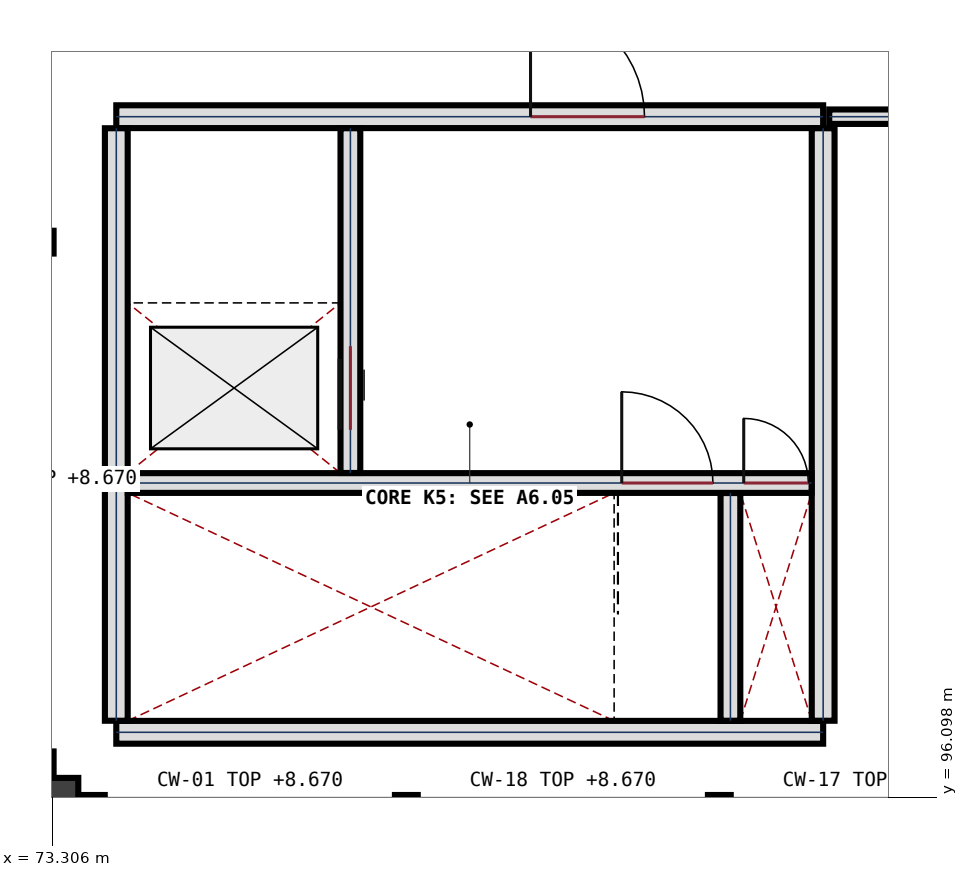
"""IFC4 building model, lengths in metres.
Left out: names, types, materials, properties, quantities, classifications, styles, units other than length and angle.
Written with IfcOpenShell. Run it as: python <this file> out.ifc"""

import sys

from ifc_helpers import new_model, si_unit, direction, frame, frame_2d, origin, origin_2d, place, context, subcontext, project, spatial, rectangle, extrude, element, fill, save


model = new_model("IFC4")
c1 = context("Model", 3, precision=1e-05, world=origin(), true_north=direction((0.0, 1.0)))
c2 = subcontext(c1, "Body", "Model", "MODEL_VIEW")
j1 = project(units=[si_unit("LENGTHUNIT", "METRE"), si_unit("PLANEANGLEUNIT", "RADIAN")], contexts=[c1])
p1 = place(None, origin())
s1 = spatial("IfcSite", under=j1, at=p1, CompositionType="ELEMENT")
p2 = place(p1, origin())
s2 = spatial("IfcBuilding", under=s1, at=p2, CompositionType="ELEMENT")
p3 = place(p2, frame((0.0, 0.0, 5.4)))
s3 = spatial("IfcBuildingStorey", under=s2, at=p3, CompositionType="ELEMENT", Elevation=5.4)
p4 = place(p3, frame((73.2, 96.0, 0.0), z_axis=(0.0, 0.0, 1.0), x_axis=(1.0, 0.0, 0.0)))
e1 = element("IfcColumn", 1, at=p4, inside=s3, PredefinedType="COLUMN", context=c2, shape_type="SweptSolid", body=[
    extrude(rectangle(XDim=0.9, YDim=0.7, at=origin_2d()), origin(), (0.0, 0.0, 1.0), 4.5),
])
p5 = place(p3, frame((73.998, 96.0, 0.0), z_axis=(0.0, 0.0, 1.0), x_axis=(-1.0, 0.0, 0.0)))
e2 = element("IfcWall", 2, at=p5, inside=s3, PredefinedType="SOLIDWALL", context=c2, shape_type="SweptSolid", body=[
    extrude(rectangle(XDim=0.35, YDim=0.25, at=frame_2d((0.175, 0.0))), origin(), (0.0, 0.0, 1.0), 3.27),
])
p6 = place(p3, frame((82.234, 96.0, 0.0), z_axis=(0.0, 0.0, 1.0), x_axis=(-1.0, 0.0, 0.0)))
e3 = element("IfcWall", 3, at=p6, inside=s3, PredefinedType="SOLIDWALL", context=c2, shape_type="SweptSolid", body=[
    extrude(rectangle(XDim=0.3, YDim=0.25, at=frame_2d((0.15, 0.0))), origin(), (0.0, 0.0, 1.0), 3.27),
])
p7 = place(p3, frame((78.116, 96.0, 0.0), z_axis=(0.0, 0.0, 1.0), x_axis=(-1.0, 0.0, 0.0)))
e4 = element("IfcWall", 4, at=p7, inside=s3, PredefinedType="SOLIDWALL", context=c2, shape_type="SweptSolid", body=[
    extrude(rectangle(XDim=0.3, YDim=0.25, at=frame_2d((0.15, 0.0))), origin(), (0.0, 0.0, 1.0), 3.27),
])
p8 = place(p3, frame((73.2, 96.348, 0.0), z_axis=(0.0, 0.0, 1.0), x_axis=(0.0, 1.0, 0.0)))
e5 = element("IfcWall", 5, at=p8, inside=s3, PredefinedType="SOLIDWALL", context=c2, shape_type="SweptSolid", body=[
    extrude(rectangle(XDim=0.35, YDim=0.25, at=frame_2d((0.175, 0.0))), origin(), (0.0, 0.0, 1.0), 3.27),
])
p9 = place(p3, frame((73.2, 103.249, 0.0), z_axis=(0.0, 0.0, 1.0), x_axis=(0.0, 1.0, 0.0)))
e6 = element("IfcWall", 6, at=p9, inside=s3, PredefinedType="SOLIDWALL", context=c2, shape_type="SweptSolid", body=[
    extrude(rectangle(XDim=0.3, YDim=0.25, at=frame_2d((0.15, 0.0))), origin(), (0.0, 0.0, 1.0), 3.27),
])
p10 = place(p3, frame((83.45, 96.95, 0.0), z_axis=(0.0, 0.0, 1.0), x_axis=(-1.0, 0.0, 0.0)))
e7 = element("IfcWall", 7, at=p10, inside=s3, PredefinedType="SHEAR", context=c2, shape_type="SweptSolid", body=[
    extrude(rectangle(XDim=9.3, YDim=0.3, at=frame_2d((4.65, 0.0))), origin(), (0.0, 0.0, 1.0), 4.5),
])
p11 = place(p3, frame((74.15, 105.05, 0.0), z_axis=(0.0, 0.0, 1.0), x_axis=(1.0, 0.0, 0.0)))
e8 = element("IfcWall", 8, at=p11, inside=s3, PredefinedType="SHEAR", context=c2, shape_type="SweptSolid", body=[
    extrude(rectangle(XDim=9.3, YDim=0.3, at=frame_2d((4.65, 0.0))), origin(), (0.0, 0.0, 1.0), 4.5),
])
p12 = place(p11, frame((5.45, 0.0, 0.0)))
e9 = element("IfcOpeningElement", 9, at=p12, cuts=e8, PredefinedType="OPENING", context=c2, shape_type="SweptSolid", body=[
    extrude(rectangle(XDim=1.5, YDim=2.25, at=frame_2d((0.75, 1.125))), frame((0.0, 0.16, 0.0), z_axis=(0.0, -1.0, 0.0), x_axis=(1.0, 0.0, 0.0)), (0.0, 0.0, 1.0), 0.32),
])
for number, where, z_axis, x_axis in (
    (10, (74.15, 97.102, 0.0), (0.0, 0.0, 1.0), (0.0, 1.0, 0.0)),
    (11, (83.45, 104.898, 0.0), (0.0, 0.0, 1.0), (0.0, -1.0, 0.0)),
):
    element("IfcWall", number, at=place(p3, frame(where, z_axis=z_axis, x_axis=x_axis)), inside=s3, PredefinedType="SHEAR", context=c2, shape_type="SweptSolid", body=[
        extrude(rectangle(XDim=7.796, YDim=0.3, at=frame_2d((3.898, 0.0))), origin(), (0.0, 0.0, 1.0), 4.5),
    ])
p13 = place(p3, frame((74.302, 100.23, 0.0), z_axis=(0.0, 0.0, 1.0), x_axis=(1.0, 0.0, 0.0)))
e12 = element("IfcWall", 12, at=p13, inside=s3, PredefinedType="SHEAR", context=c2, shape_type="SweptSolid", body=[
    extrude(rectangle(XDim=8.996, YDim=0.26, at=frame_2d((4.498, 0.0))), origin(), (0.0, 0.0, 1.0), 4.5),
])
p14 = place(p13, frame((6.498, 0.0, 0.0)))
e13 = element("IfcOpeningElement", 13, at=p14, cuts=e12, PredefinedType="OPENING", context=c2, shape_type="SweptSolid", body=[
    extrude(rectangle(XDim=1.2, YDim=2.2, at=frame_2d((0.6, 1.1))), frame((0.0, 0.14, 0.0), z_axis=(0.0, -1.0, 0.0), x_axis=(1.0, 0.0, 0.0)), (0.0, 0.0, 1.0), 0.28),
])
p15 = place(p13, frame((8.103, 0.0, 0.0)))
e14 = element("IfcOpeningElement", 14, at=p15, cuts=e12, PredefinedType="OPENING", context=c2, shape_type="SweptSolid", body=[
    extrude(rectangle(XDim=0.85, YDim=2.05, at=frame_2d((0.425, 1.025))), frame((0.0, 0.14, 0.0), z_axis=(0.0, -1.0, 0.0), x_axis=(1.0, 0.0, 0.0)), (0.0, 0.0, 1.0), 0.28),
])
p16 = place(p3, frame((82.23, 97.102, 0.0), z_axis=(0.0, 0.0, 1.0), x_axis=(0.0, 1.0, 0.0)))
e15 = element("IfcWall", 15, at=p16, inside=s3, PredefinedType="SHEAR", context=c2, shape_type="SweptSolid", body=[
    extrude(rectangle(XDim=2.996, YDim=0.26, at=frame_2d((1.498, 0.0))), origin(), (0.0, 0.0, 1.0), 4.5),
])
p17 = place(p3, frame((77.23, 100.362, 0.0), z_axis=(0.0, 0.0, 1.0), x_axis=(0.0, 1.0, 0.0)))
e16 = element("IfcWall", 16, at=p17, inside=s3, PredefinedType="SHEAR", context=c2, shape_type="SweptSolid", body=[
    extrude(rectangle(XDim=4.536, YDim=0.26, at=frame_2d((2.268, 0.0))), origin(), (0.0, 0.0, 1.0), 4.5),
])
p18 = place(p17, frame((0.568, 0.0, 0.0)))
e17 = element("IfcOpeningElement", 17, at=p18, cuts=e16, PredefinedType="OPENING", context=c2, shape_type="SweptSolid", body=[
    extrude(rectangle(XDim=1.1, YDim=2.15, at=frame_2d((0.55, 1.075))), frame((0.0, 0.14, 0.0), z_axis=(0.0, -1.0, 0.0), x_axis=(1.0, 0.0, 0.0)), (0.0, 0.0, 1.0), 0.28),
])
p19 = place(p3, frame((83.53, 105.05, 0.0), z_axis=(0.0, 0.0, 1.0), x_axis=(1.0, 0.0, 0.0)))
e18 = element("IfcWall", 18, at=p19, inside=s3, PredefinedType="PARTITIONING", context=c2, shape_type="SweptSolid", body=[
    extrude(rectangle(XDim=50.787, YDim=0.19, at=frame_2d((25.394, 0.0))), origin(), (0.0, 0.0, 1.0), 2.81),
])
p20 = place(p19, frame((22.97, 0.0, 0.0)))
e19 = element("IfcOpeningElement", 19, at=p20, cuts=e18, PredefinedType="OPENING", context=c2, shape_type="SweptSolid", body=[
    extrude(rectangle(XDim=1.0, YDim=2.2, at=frame_2d((0.5, 1.1))), frame((0.0, 0.105, 0.0), z_axis=(0.0, -1.0, 0.0), x_axis=(1.0, 0.0, 0.0)), (0.0, 0.0, 1.0), 0.21),
])
p21 = place(p12, origin())
e20 = element("IfcDoor", 20, at=p21, inside=s3, OperationType="SINGLE_SWING_LEFT", PredefinedType="DOOR", context=c2, shape_type="SweptSolid", body=[
    extrude(rectangle(XDim=1.5, YDim=2.25, at=frame_2d((0.75, 1.125))), frame((0.0, 0.032, 0.0), z_axis=(0.0, -1.0, 0.0), x_axis=(1.0, 0.0, 0.0)), (0.0, 0.0, 1.0), 0.065),
])
fill(e9, e20)
p22 = place(p14, origin())
e21 = element("IfcDoor", 21, at=p22, inside=s3, OperationType="SINGLE_SWING_LEFT", PredefinedType="DOOR", context=c2, shape_type="SweptSolid", body=[
    extrude(rectangle(XDim=1.2, YDim=2.2, at=frame_2d((0.6, 1.1))), frame((0.0, 0.032, 0.0), z_axis=(0.0, -1.0, 0.0), x_axis=(1.0, 0.0, 0.0)), (0.0, 0.0, 1.0), 0.065),
])
fill(e13, e21)
p23 = place(p15, origin())
e22 = element("IfcDoor", 22, at=p23, inside=s3, OperationType="SINGLE_SWING_LEFT", PredefinedType="DOOR", context=c2, shape_type="SweptSolid", body=[
    extrude(rectangle(XDim=0.85, YDim=2.05, at=frame_2d((0.425, 1.025))), frame((0.0, 0.032, 0.0), z_axis=(0.0, -1.0, 0.0), x_axis=(1.0, 0.0, 0.0)), (0.0, 0.0, 1.0), 0.065),
])
fill(e14, e22)
p24 = place(p18, origin())
e23 = element("IfcDoor", 23, at=p24, inside=s3, OperationType="SLIDING_TO_LEFT", PredefinedType="DOOR", context=c2, shape_type="SweptSolid", body=[
    extrude(rectangle(XDim=1.1, YDim=2.15, at=frame_2d((0.55, 1.075))), frame((0.0, 0.032, 0.0), z_axis=(0.0, -1.0, 0.0), x_axis=(1.0, 0.0, 0.0)), (0.0, 0.0, 1.0), 0.065),
])
fill(e17, e23)
save(model, sys.argv[1])
